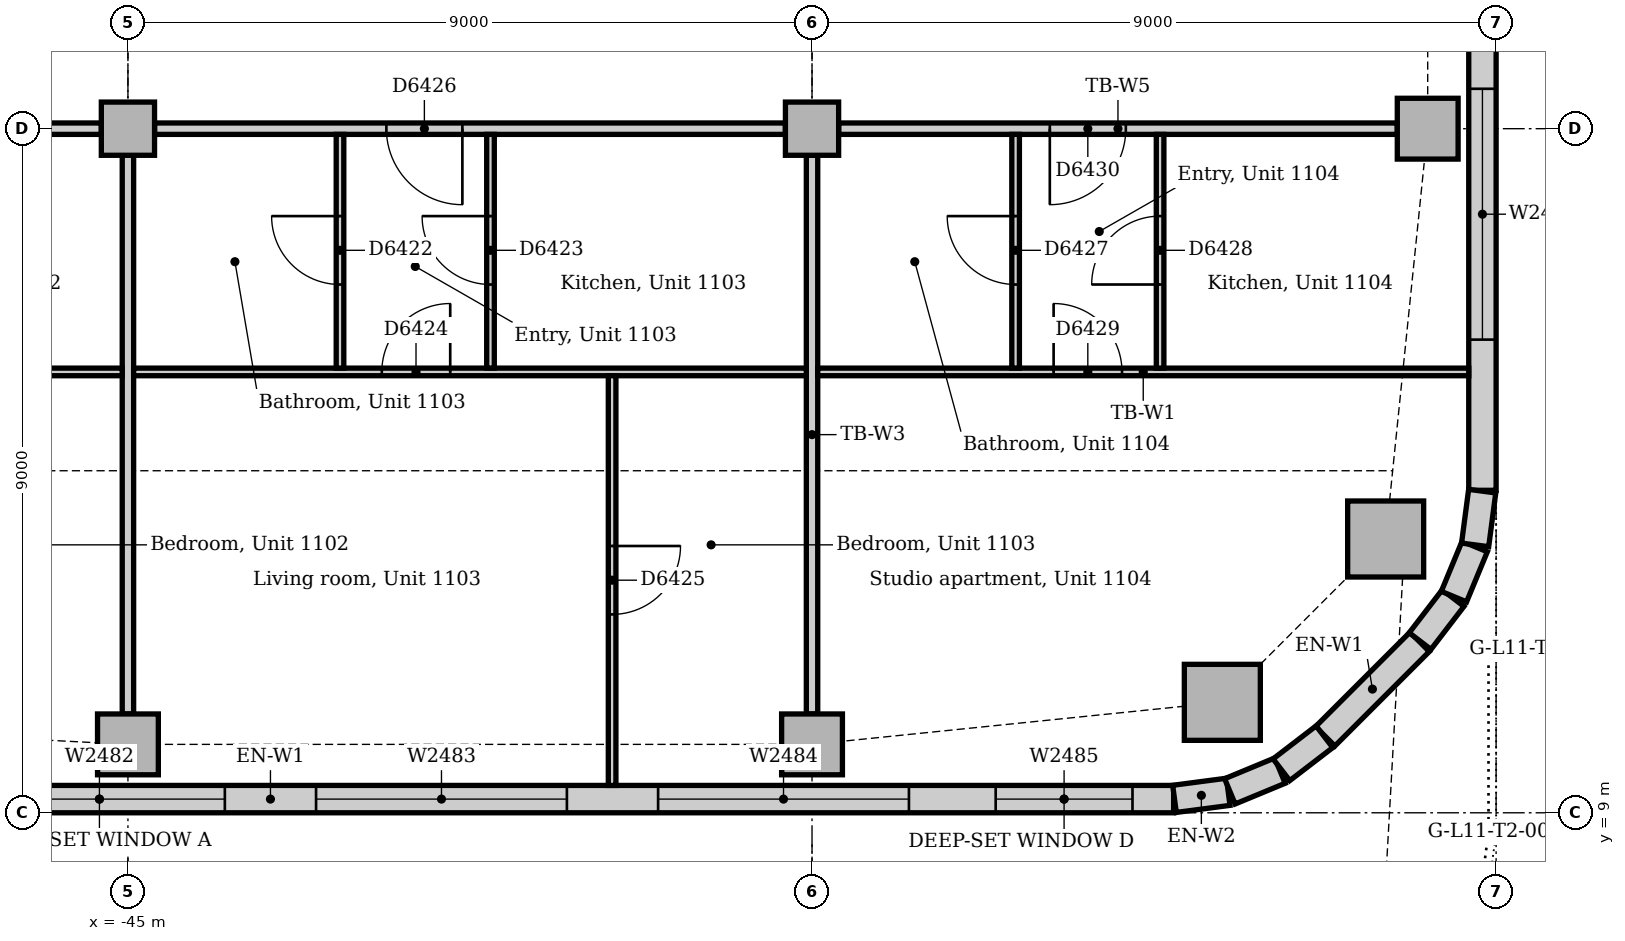
"""IFC4 building model, lengths in metres.
Left out: names, types, materials, properties, quantities, classifications, styles, units other than length and angle.
Written with IfcOpenShell. Run it as: python <this file> out.ifc"""

import sys

from ifc_helpers import new_model, si_unit, direction, frame, frame_2d, origin, origin_2d, place, context, subcontext, project, spatial, rectangle, extrude, element, fill, save


model = new_model("IFC4")
c1 = context("Model", 3, precision=1e-05, world=origin(), true_north=direction((0.0, 1.0)))
c2 = subcontext(c1, "Body", "Model", "MODEL_VIEW")
j1 = project(units=[si_unit("LENGTHUNIT", "METRE"), si_unit("PLANEANGLEUNIT", "RADIAN")], contexts=[c1])
p1 = place(None, origin())
s1 = spatial("IfcSite", under=j1, at=p1, CompositionType="ELEMENT")
p2 = place(p1, origin())
s2 = spatial("IfcBuilding", under=s1, at=p2, CompositionType="ELEMENT")
p3 = place(p2, frame((0.0, 0.0, 51.0)))
s3 = spatial("IfcBuildingStorey", under=s2, at=p3, CompositionType="ELEMENT", Elevation=51.0)
for number, where, z_axis, x_axis in (
    (1, (-30.602, 10.453, -0.15), (0.0, 0.0, 1.0), (1.0, 0.0, 0.0)),
    (2, (-28.453, 12.602, -0.15), (0.0, 0.0, 1.0), (1.0, 0.0, 0.0)),
):
    element("IfcColumn", number, at=place(p3, frame(where, z_axis=z_axis, x_axis=x_axis)), inside=s3, PredefinedType="COLUMN", context=c2, shape_type="SweptSolid", body=[
        extrude(rectangle(XDim=1.0, YDim=1.0, at=origin_2d()), origin(), (0.0, 0.0, 1.0), 4.0),
    ])
for number, where, z_axis, x_axis in (
    (3, (-45.0, 9.9, -0.15), (0.0, 0.0, 1.0), (1.0, 0.0, 0.0)),
    (4, (-36.0, 9.9, -0.15), (0.0, 0.0, 1.0), (1.0, 0.0, 0.0)),
):
    element("IfcColumn", number, at=place(p3, frame(where, z_axis=z_axis, x_axis=x_axis)), inside=s3, PredefinedType="COLUMN", context=c2, shape_type="SweptSolid", body=[
        extrude(rectangle(XDim=0.8, YDim=0.8, at=origin_2d()), origin(), (0.0, 0.0, 1.0), 4.0),
    ])
p4 = place(p3, frame((-27.9, 18.0, 0.0), z_axis=(0.0, 0.0, 1.0), x_axis=(1.0, 0.0, 0.0)))
e5 = element("IfcColumn", 5, at=p4, inside=s3, PredefinedType="COLUMN", context=c2, shape_type="SweptSolid", body=[
    extrude(rectangle(XDim=0.8, YDim=0.8, at=origin_2d()), origin(), (0.0, 0.0, 1.0), 3.85),
])
for number, where, z_axis, x_axis in (
    (6, (-45.0, 18.0, 0.0), (0.0, 0.0, 1.0), (1.0, 0.0, 0.0)),
    (7, (-36.0, 18.0, 0.0), (0.0, 0.0, 1.0), (1.0, 0.0, 0.0)),
):
    element("IfcColumn", number, at=place(p3, frame(where, z_axis=z_axis, x_axis=x_axis)), inside=s3, PredefinedType="COLUMN", context=c2, shape_type="SweptSolid", body=[
        extrude(rectangle(XDim=0.7, YDim=0.7, at=origin_2d()), origin(), (0.0, 0.0, 1.0), 3.85),
    ])
p5 = place(p3, frame((-55.007, 9.18, 0.0), z_axis=(0.0, 0.0, 1.0), x_axis=(1.0, 0.0, 0.0)))
e8 = element("IfcWall", 8, at=p5, inside=s3, PredefinedType="STANDARD", context=c2, shape_type="SweptSolid", body=[
    extrude(rectangle(XDim=23.765, YDim=0.36, at=frame_2d((11.882, 0.0))), origin(), (0.0, 0.0, 1.0), 3.85),
])
p6 = place(p5, frame((4.232, 0.0, 0.0)))
e9 = element("IfcOpeningElement", 9, at=p6, cuts=e8, PredefinedType="OPENING", context=c2, shape_type="SweptSolid", body=[
    extrude(rectangle(XDim=1.8, YDim=2.4, at=frame_2d((0.9, 1.2))), frame((0.0, 0.19, 0.0), z_axis=(0.0, -1.0, 0.0), x_axis=(1.0, 0.0, 0.0)), (0.0, 0.0, 1.0), 0.38),
])
p7 = place(p5, frame((7.982, 0.0, 0.9)))
e10 = element("IfcOpeningElement", 10, at=p7, cuts=e8, PredefinedType="OPENING", context=c2, shape_type="SweptSolid", body=[
    extrude(rectangle(XDim=3.3, YDim=1.6, at=frame_2d((1.65, 0.8))), frame((0.0, 0.19, 0.0), z_axis=(0.0, -1.0, 0.0), x_axis=(1.0, 0.0, 0.0)), (0.0, 0.0, 1.0), 0.38),
])
p8 = place(p5, frame((12.482, 0.0, 0.9)))
e11 = element("IfcOpeningElement", 11, at=p8, cuts=e8, PredefinedType="OPENING", context=c2, shape_type="SweptSolid", body=[
    extrude(rectangle(XDim=3.3, YDim=1.6, at=frame_2d((1.65, 0.8))), frame((0.0, 0.19, 0.0), z_axis=(0.0, -1.0, 0.0), x_axis=(1.0, 0.0, 0.0)), (0.0, 0.0, 1.0), 0.38),
])
p9 = place(p5, frame((16.982, 0.0, 0.9)))
e12 = element("IfcOpeningElement", 12, at=p9, cuts=e8, PredefinedType="OPENING", context=c2, shape_type="SweptSolid", body=[
    extrude(rectangle(XDim=3.3, YDim=1.6, at=frame_2d((1.65, 0.8))), frame((0.0, 0.19, 0.0), z_axis=(0.0, -1.0, 0.0), x_axis=(1.0, 0.0, 0.0)), (0.0, 0.0, 1.0), 0.38),
])
p10 = place(p5, frame((21.424, 0.0, 0.9)))
e13 = element("IfcOpeningElement", 13, at=p10, cuts=e8, PredefinedType="OPENING", context=c2, shape_type="SweptSolid", body=[
    extrude(rectangle(XDim=1.8, YDim=1.6, at=frame_2d((0.9, 0.8))), frame((0.0, 0.19, 0.0), z_axis=(0.0, -1.0, 0.0), x_axis=(1.0, 0.0, 0.0)), (0.0, 0.0, 1.0), 0.38),
])
p11 = place(p3, frame((-29.249, 10.006, 0.0), z_axis=(0.0, 0.0, 1.0), x_axis=(0.707106781187, 0.707106781187, 0.0)))
e14 = element("IfcWall", 14, at=p11, inside=s3, PredefinedType="STANDARD", context=c2, shape_type="SweptSolid", body=[
    extrude(rectangle(XDim=1.757, YDim=0.36, at=frame_2d((0.879, 0.0))), origin(), (0.0, 0.0, 1.0), 3.85),
])
p12 = place(p3, frame((-27.18, 13.243, 0.0), z_axis=(0.0, 0.0, 1.0), x_axis=(0.0, 1.0, 0.0)))
e15 = element("IfcWall", 15, at=p12, inside=s3, PredefinedType="STANDARD", context=c2, shape_type="SweptSolid", body=[
    extrude(rectangle(XDim=7.757, YDim=0.36, at=frame_2d((3.879, 0.0))), origin(), (0.0, 0.0, 1.0), 3.85),
])
p13 = place(p12, frame((1.982, 0.0, 0.9)))
e16 = element("IfcOpeningElement", 16, at=p13, cuts=e15, PredefinedType="OPENING", context=c2, shape_type="SweptSolid", body=[
    extrude(rectangle(XDim=3.3, YDim=1.6, at=frame_2d((1.65, 0.8))), frame((0.0, 0.19, 0.0), z_axis=(0.0, -1.0, 0.0), x_axis=(1.0, 0.0, 0.0)), (0.0, 0.0, 1.0), 0.38),
])
for number, where, z_axis, x_axis in (
    (17, (-31.231, 9.183, 0.0), (0.0, 0.0, 1.0), (0.991, 0.131, 0.0)),
    (18, (-30.503, 9.282, 0.0), (0.0, 0.0, 1.0), (0.924, 0.383, 0.0)),
):
    element("IfcWall", number, at=place(p3, frame(where, z_axis=z_axis, x_axis=x_axis)), inside=s3, PredefinedType="STANDARD", context=c2, shape_type="SweptSolid", body=[
        extrude(rectangle(XDim=0.713, YDim=0.36, at=frame_2d((0.356, 0.0))), origin(), (0.0, 0.0, 1.0), 3.85),
    ])
for number, where, z_axis, x_axis in (
    (19, (-29.825, 9.566, 0.0), (0.0, 0.0, 1.0), (0.793, 0.609, 0.0)),
    (20, (-28.0, 11.259, 0.0), (0.0, 0.0, 1.0), (0.609, 0.793, 0.0)),
):
    element("IfcWall", number, at=place(p3, frame(where, z_axis=z_axis, x_axis=x_axis)), inside=s3, PredefinedType="STANDARD", context=c2, shape_type="SweptSolid", body=[
        extrude(rectangle(XDim=0.713, YDim=0.36, at=frame_2d((0.357, 0.0))), origin(), (0.0, 0.0, 1.0), 3.85),
    ])
for number, where, z_axis, x_axis in (
    (21, (-27.555, 11.844, 0.0), (0.0, 0.0, 1.0), (0.383, 0.924, 0.0)),
    (22, (-27.276, 12.524, 0.0), (0.0, 0.0, 1.0), (0.131, 0.991, 0.0)),
):
    element("IfcWall", number, at=place(p3, frame(where, z_axis=z_axis, x_axis=x_axis)), inside=s3, PredefinedType="STANDARD", context=c2, shape_type="SweptSolid", body=[
        extrude(rectangle(XDim=0.713, YDim=0.36, at=frame_2d((0.356, 0.0))), origin(), (0.0, 0.0, 1.0), 3.85),
    ])
p14 = place(p3, frame((-35.65, 18.0, 0.0), z_axis=(0.0, 0.0, 1.0), x_axis=(1.0, 0.0, 0.0)))
e23 = element("IfcWall", 23, at=p14, inside=s3, PredefinedType="PARTITIONING", context=c2, shape_type="SweptSolid", body=[
    extrude(rectangle(XDim=7.35, YDim=0.15, at=frame_2d((3.675, 0.0))), origin(), (0.0, 0.0, 1.0), 3.158),
])
p15 = place(p14, frame((2.778, 0.0, 0.0)))
e24 = element("IfcOpeningElement", 24, at=p15, cuts=e23, PredefinedType="OPENING", context=c2, shape_type="SweptSolid", body=[
    extrude(rectangle(XDim=1.0, YDim=2.1, at=frame_2d((0.5, 1.05))), frame((0.0, 0.085, 0.0), z_axis=(0.0, -1.0, 0.0), x_axis=(1.0, 0.0, 0.0)), (0.0, 0.0, 1.0), 0.17),
])
p16 = place(p3, frame((-44.65, 18.0, 0.0), z_axis=(0.0, 0.0, 1.0), x_axis=(1.0, 0.0, 0.0)))
e25 = element("IfcWall", 25, at=p16, inside=s3, PredefinedType="PARTITIONING", context=c2, shape_type="SweptSolid", body=[
    extrude(rectangle(XDim=8.3, YDim=0.15, at=frame_2d((4.15, 0.0))), origin(), (0.0, 0.0, 1.0), 3.158),
])
p17 = place(p16, frame((3.05, 0.0, 0.0)))
e26 = element("IfcOpeningElement", 26, at=p17, cuts=e25, PredefinedType="OPENING", context=c2, shape_type="SweptSolid", body=[
    extrude(rectangle(XDim=1.0, YDim=2.1, at=frame_2d((0.5, 1.05))), frame((0.0, 0.085, 0.0), z_axis=(0.0, -1.0, 0.0), x_axis=(1.0, 0.0, 0.0)), (0.0, 0.0, 1.0), 0.17),
])
p18 = place(p3, frame((-53.65, 18.0, 0.0), z_axis=(0.0, 0.0, 1.0), x_axis=(1.0, 0.0, 0.0)))
e27 = element("IfcWall", 27, at=p18, inside=s3, PredefinedType="PARTITIONING", context=c2, shape_type="SweptSolid", body=[
    extrude(rectangle(XDim=8.3, YDim=0.15, at=frame_2d((4.15, 0.0))), origin(), (0.0, 0.0, 1.0), 3.158),
])
p19 = place(p18, frame((2.94, 0.0, 0.0)))
e28 = element("IfcOpeningElement", 28, at=p19, cuts=e27, PredefinedType="OPENING", context=c2, shape_type="SweptSolid", body=[
    extrude(rectangle(XDim=1.0, YDim=2.1, at=frame_2d((0.5, 1.05))), frame((0.0, 0.085, 0.0), z_axis=(0.0, -1.0, 0.0), x_axis=(1.0, 0.0, 0.0)), (0.0, 0.0, 1.0), 0.17),
])
for number, where, z_axis, x_axis in (
    (29, (-45.0, 10.3, 0.0), (0.0, 0.0, 1.0), (0.0, 1.0, 0.0)),
    (30, (-36.0, 10.3, 0.0), (0.0, 0.0, 1.0), (0.0, 1.0, 0.0)),
):
    element("IfcWall", number, at=place(p3, frame(where, z_axis=z_axis, x_axis=x_axis)), inside=s3, PredefinedType="PARTITIONING", context=c2, shape_type="SweptSolid", body=[
        extrude(rectangle(XDim=7.35, YDim=0.15, at=frame_2d((3.675, 0.0))), origin(), (0.0, 0.0, 1.0), 3.256),
    ])
p20 = place(p3, frame((-35.925, 14.8, 0.0), z_axis=(0.0, 0.0, 1.0), x_axis=(1.0, 0.0, 0.0)))
e31 = element("IfcWall", 31, at=p20, inside=s3, PredefinedType="PARTITIONING", context=c2, shape_type="SweptSolid", body=[
    extrude(rectangle(XDim=8.565, YDim=0.1, at=frame_2d((4.282, 0.0))), origin(), (0.0, 0.0, 1.0), 3.85),
])
p21 = place(p20, frame((3.103, 0.0, 0.0)))
e32 = element("IfcOpeningElement", 32, at=p21, cuts=e31, PredefinedType="OPENING", context=c2, shape_type="SweptSolid", body=[
    extrude(rectangle(XDim=0.9, YDim=2.1, at=frame_2d((0.45, 1.05))), frame((0.0, 0.06, 0.0), z_axis=(0.0, -1.0, 0.0), x_axis=(1.0, 0.0, 0.0)), (0.0, 0.0, 1.0), 0.12),
])
p22 = place(p3, frame((-44.925, 14.8, 0.0), z_axis=(0.0, 0.0, 1.0), x_axis=(1.0, 0.0, 0.0)))
e33 = element("IfcWall", 33, at=p22, inside=s3, PredefinedType="PARTITIONING", context=c2, shape_type="SweptSolid", body=[
    extrude(rectangle(XDim=8.85, YDim=0.1, at=frame_2d((4.425, 0.0))), origin(), (0.0, 0.0, 1.0), 3.85),
])
p23 = place(p22, frame((3.265, 0.0, 0.0)))
e34 = element("IfcOpeningElement", 34, at=p23, cuts=e33, PredefinedType="OPENING", context=c2, shape_type="SweptSolid", body=[
    extrude(rectangle(XDim=0.9, YDim=2.1, at=frame_2d((0.45, 1.05))), frame((0.0, 0.06, 0.0), z_axis=(0.0, -1.0, 0.0), x_axis=(1.0, 0.0, 0.0)), (0.0, 0.0, 1.0), 0.12),
])
p24 = place(p3, frame((-53.925, 14.8, 0.0), z_axis=(0.0, 0.0, 1.0), x_axis=(1.0, 0.0, 0.0)))
e35 = element("IfcWall", 35, at=p24, inside=s3, PredefinedType="PARTITIONING", context=c2, shape_type="SweptSolid", body=[
    extrude(rectangle(XDim=8.85, YDim=0.1, at=frame_2d((4.425, 0.0))), origin(), (0.0, 0.0, 1.0), 3.85),
])
p25 = place(p24, frame((3.265, 0.0, 0.0)))
e36 = element("IfcOpeningElement", 36, at=p25, cuts=e35, PredefinedType="OPENING", context=c2, shape_type="SweptSolid", body=[
    extrude(rectangle(XDim=0.9, YDim=2.1, at=frame_2d((0.45, 1.05))), frame((0.0, 0.06, 0.0), z_axis=(0.0, -1.0, 0.0), x_axis=(1.0, 0.0, 0.0)), (0.0, 0.0, 1.0), 0.12),
])
p26 = place(p3, frame((-38.63, 9.36, 0.0), z_axis=(0.0, 0.0, 1.0), x_axis=(0.0, 1.0, 0.0)))
e37 = element("IfcWall", 37, at=p26, inside=s3, PredefinedType="PARTITIONING", context=c2, shape_type="SweptSolid", body=[
    extrude(rectangle(XDim=5.39, YDim=0.1, at=frame_2d((2.695, 0.0))), origin(), (0.0, 0.0, 1.0), 3.85),
])
p27 = place(p26, frame((2.25, 0.0, 0.0)))
e38 = element("IfcOpeningElement", 38, at=p27, cuts=e37, PredefinedType="OPENING", context=c2, shape_type="SweptSolid", body=[
    extrude(rectangle(XDim=0.9, YDim=2.1, at=frame_2d((0.45, 1.05))), frame((0.0, 0.06, 0.0), z_axis=(0.0, -1.0, 0.0), x_axis=(1.0, 0.0, 0.0)), (0.0, 0.0, 1.0), 0.12),
])
p28 = place(p3, frame((-42.21, 14.85, 0.0), z_axis=(0.0, 0.0, 1.0), x_axis=(0.0, 1.0, 0.0)))
e39 = element("IfcWall", 39, at=p28, inside=s3, PredefinedType="PARTITIONING", context=c2, shape_type="SweptSolid", body=[
    extrude(rectangle(XDim=3.075, YDim=0.1, at=frame_2d((1.538, 0.0))), origin(), (0.0, 0.0, 1.0), 3.85),
])
p29 = place(p28, frame((1.1, 0.0, 0.0)))
e40 = element("IfcOpeningElement", 40, at=p29, cuts=e39, PredefinedType="OPENING", context=c2, shape_type="SweptSolid", body=[
    extrude(rectangle(XDim=0.9, YDim=2.1, at=frame_2d((0.45, 1.05))), frame((0.0, 0.06, 0.0), z_axis=(0.0, -1.0, 0.0), x_axis=(1.0, 0.0, 0.0)), (0.0, 0.0, 1.0), 0.12),
])
p30 = place(p3, frame((-40.23, 14.85, 0.0), z_axis=(0.0, 0.0, 1.0), x_axis=(0.0, 1.0, 0.0)))
e41 = element("IfcWall", 41, at=p30, inside=s3, PredefinedType="PARTITIONING", context=c2, shape_type="SweptSolid", body=[
    extrude(rectangle(XDim=3.075, YDim=0.1, at=frame_2d((1.538, 0.0))), origin(), (0.0, 0.0, 1.0), 3.85),
])
p31 = place(p30, frame((1.1, 0.0, 0.0)))
e42 = element("IfcOpeningElement", 42, at=p31, cuts=e41, PredefinedType="OPENING", context=c2, shape_type="SweptSolid", body=[
    extrude(rectangle(XDim=0.9, YDim=2.1, at=frame_2d((0.45, 1.05))), frame((0.0, 0.06, 0.0), z_axis=(0.0, -1.0, 0.0), x_axis=(1.0, 0.0, 0.0)), (0.0, 0.0, 1.0), 0.12),
])
p32 = place(p3, frame((-33.322, 14.85, 0.0), z_axis=(0.0, 0.0, 1.0), x_axis=(0.0, 1.0, 0.0)))
e43 = element("IfcWall", 43, at=p32, inside=s3, PredefinedType="PARTITIONING", context=c2, shape_type="SweptSolid", body=[
    extrude(rectangle(XDim=3.075, YDim=0.1, at=frame_2d((1.538, 0.0))), origin(), (0.0, 0.0, 1.0), 3.85),
])
p33 = place(p32, frame((1.1, 0.0, 0.0)))
e44 = element("IfcOpeningElement", 44, at=p33, cuts=e43, PredefinedType="OPENING", context=c2, shape_type="SweptSolid", body=[
    extrude(rectangle(XDim=0.9, YDim=2.1, at=frame_2d((0.45, 1.05))), frame((0.0, 0.06, 0.0), z_axis=(0.0, -1.0, 0.0), x_axis=(1.0, 0.0, 0.0)), (0.0, 0.0, 1.0), 0.12),
])
p34 = place(p3, frame((-31.421, 14.85, 0.0), z_axis=(0.0, 0.0, 1.0), x_axis=(0.0, 1.0, 0.0)))
e45 = element("IfcWall", 45, at=p34, inside=s3, PredefinedType="PARTITIONING", context=c2, shape_type="SweptSolid", body=[
    extrude(rectangle(XDim=3.075, YDim=0.1, at=frame_2d((1.538, 0.0))), origin(), (0.0, 0.0, 1.0), 3.85),
])
p35 = place(p34, frame((1.1, 0.0, 0.0)))
e46 = element("IfcOpeningElement", 46, at=p35, cuts=e45, PredefinedType="OPENING", context=c2, shape_type="SweptSolid", body=[
    extrude(rectangle(XDim=0.9, YDim=2.1, at=frame_2d((0.45, 1.05))), frame((0.0, 0.06, 0.0), z_axis=(0.0, -1.0, 0.0), x_axis=(1.0, 0.0, 0.0)), (0.0, 0.0, 1.0), 0.12),
])
p36 = place(p7, origin())
e47 = element("IfcWindow", 47, at=p36, inside=s3, PartitioningType="SINGLE_PANEL", PredefinedType="WINDOW", context=c2, shape_type="SweptSolid", body=[
    extrude(rectangle(XDim=3.3, YDim=1.6, at=frame_2d((1.65, 0.8))), frame((0.0, 0.13, 0.0), z_axis=(0.0, -1.0, 0.0), x_axis=(1.0, 0.0, 0.0)), (0.0, 0.0, 1.0), 0.06),
])
fill(e10, e47)
p37 = place(p8, origin())
e48 = element("IfcWindow", 48, at=p37, inside=s3, PartitioningType="SINGLE_PANEL", PredefinedType="WINDOW", context=c2, shape_type="SweptSolid", body=[
    extrude(rectangle(XDim=3.3, YDim=1.6, at=frame_2d((1.65, 0.8))), frame((0.0, 0.13, 0.0), z_axis=(0.0, -1.0, 0.0), x_axis=(1.0, 0.0, 0.0)), (0.0, 0.0, 1.0), 0.06),
])
fill(e11, e48)
p38 = place(p9, origin())
e49 = element("IfcWindow", 49, at=p38, inside=s3, PartitioningType="SINGLE_PANEL", PredefinedType="WINDOW", context=c2, shape_type="SweptSolid", body=[
    extrude(rectangle(XDim=3.3, YDim=1.6, at=frame_2d((1.65, 0.8))), frame((0.0, 0.13, 0.0), z_axis=(0.0, -1.0, 0.0), x_axis=(1.0, 0.0, 0.0)), (0.0, 0.0, 1.0), 0.06),
])
fill(e12, e49)
p39 = place(p10, origin())
e50 = element("IfcWindow", 50, at=p39, inside=s3, PartitioningType="SINGLE_PANEL", PredefinedType="WINDOW", context=c2, shape_type="SweptSolid", body=[
    extrude(rectangle(XDim=1.8, YDim=1.6, at=frame_2d((0.9, 0.8))), frame((0.0, 0.13, 0.0), z_axis=(0.0, -1.0, 0.0), x_axis=(1.0, 0.0, 0.0)), (0.0, 0.0, 1.0), 0.06),
])
fill(e13, e50)
p40 = place(p13, origin())
e51 = element("IfcWindow", 51, at=p40, inside=s3, PartitioningType="SINGLE_PANEL", PredefinedType="WINDOW", context=c2, shape_type="SweptSolid", body=[
    extrude(rectangle(XDim=3.3, YDim=1.6, at=frame_2d((1.65, 0.8))), frame((0.0, 0.13, 0.0), z_axis=(0.0, -1.0, 0.0), x_axis=(1.0, 0.0, 0.0)), (0.0, 0.0, 1.0), 0.06),
])
fill(e16, e51)
p41 = place(p29, origin())
e52 = element("IfcDoor", 52, at=p41, inside=s3, OperationType="SINGLE_SWING_RIGHT", PredefinedType="DOOR", context=c2, shape_type="SweptSolid", body=[
    extrude(rectangle(XDim=0.9, YDim=2.1, at=frame_2d((0.45, 1.05))), frame((0.0, 0.025, 0.0), z_axis=(0.0, -1.0, 0.0), x_axis=(1.0, 0.0, 0.0)), (0.0, 0.0, 1.0), 0.05),
])
fill(e40, e52)
p42 = place(p31, origin())
e53 = element("IfcDoor", 53, at=p42, inside=s3, OperationType="SINGLE_SWING_RIGHT", PredefinedType="DOOR", context=c2, shape_type="SweptSolid", body=[
    extrude(rectangle(XDim=0.9, YDim=2.1, at=frame_2d((0.45, 1.05))), frame((0.0, 0.025, 0.0), z_axis=(0.0, -1.0, 0.0), x_axis=(1.0, 0.0, 0.0)), (0.0, 0.0, 1.0), 0.05),
])
fill(e42, e53)
p43 = place(p23, origin())
e54 = element("IfcDoor", 54, at=p43, inside=s3, OperationType="SINGLE_SWING_RIGHT", PredefinedType="DOOR", context=c2, shape_type="SweptSolid", body=[
    extrude(rectangle(XDim=0.9, YDim=2.1, at=frame_2d((0.45, 1.05))), frame((0.0, 0.025, 0.0), z_axis=(0.0, -1.0, 0.0), x_axis=(1.0, 0.0, 0.0)), (0.0, 0.0, 1.0), 0.05),
])
fill(e34, e54)
p44 = place(p27, frame((0.9, 0.0, 0.0), z_axis=(0.0, 0.0, 1.0), x_axis=(-1.0, 0.0, 0.0)))
e55 = element("IfcDoor", 55, at=p44, inside=s3, OperationType="SINGLE_SWING_LEFT", PredefinedType="DOOR", context=c2, shape_type="SweptSolid", body=[
    extrude(rectangle(XDim=0.9, YDim=2.1, at=frame_2d((0.45, 1.05))), frame((0.0, 0.025, 0.0), z_axis=(0.0, -1.0, 0.0), x_axis=(1.0, 0.0, 0.0)), (0.0, 0.0, 1.0), 0.05),
])
fill(e38, e55)
p45 = place(p17, frame((1.0, 0.0, 0.0), z_axis=(0.0, 0.0, 1.0), x_axis=(-1.0, 0.0, 0.0)))
e56 = element("IfcDoor", 56, at=p45, inside=s3, OperationType="SINGLE_SWING_LEFT", PredefinedType="DOOR", context=c2, shape_type="SweptSolid", body=[
    extrude(rectangle(XDim=1.0, YDim=2.1, at=frame_2d((0.5, 1.05))), frame((0.0, 0.025, 0.0), z_axis=(0.0, -1.0, 0.0), x_axis=(1.0, 0.0, 0.0)), (0.0, 0.0, 1.0), 0.05),
])
fill(e26, e56)
p46 = place(p33, origin())
e57 = element("IfcDoor", 57, at=p46, inside=s3, OperationType="SINGLE_SWING_RIGHT", PredefinedType="DOOR", context=c2, shape_type="SweptSolid", body=[
    extrude(rectangle(XDim=0.9, YDim=2.1, at=frame_2d((0.45, 1.05))), frame((0.0, 0.025, 0.0), z_axis=(0.0, -1.0, 0.0), x_axis=(1.0, 0.0, 0.0)), (0.0, 0.0, 1.0), 0.05),
])
fill(e44, e57)
p47 = place(p35, origin())
e58 = element("IfcDoor", 58, at=p47, inside=s3, OperationType="SINGLE_SWING_LEFT", PredefinedType="DOOR", context=c2, shape_type="SweptSolid", body=[
    extrude(rectangle(XDim=0.9, YDim=2.1, at=frame_2d((0.45, 1.05))), frame((0.0, 0.025, 0.0), z_axis=(0.0, -1.0, 0.0), x_axis=(1.0, 0.0, 0.0)), (0.0, 0.0, 1.0), 0.05),
])
fill(e46, e58)
p48 = place(p21, origin())
e59 = element("IfcDoor", 59, at=p48, inside=s3, OperationType="SINGLE_SWING_LEFT", PredefinedType="DOOR", context=c2, shape_type="SweptSolid", body=[
    extrude(rectangle(XDim=0.9, YDim=2.1, at=frame_2d((0.45, 1.05))), frame((0.0, 0.025, 0.0), z_axis=(0.0, -1.0, 0.0), x_axis=(1.0, 0.0, 0.0)), (0.0, 0.0, 1.0), 0.05),
])
fill(e32, e59)
p49 = place(p15, frame((1.0, 0.0, 0.0), z_axis=(0.0, 0.0, 1.0), x_axis=(-1.0, 0.0, 0.0)))
e60 = element("IfcDoor", 60, at=p49, inside=s3, OperationType="SINGLE_SWING_RIGHT", PredefinedType="DOOR", context=c2, shape_type="SweptSolid", body=[
    extrude(rectangle(XDim=1.0, YDim=2.1, at=frame_2d((0.5, 1.05))), frame((0.0, 0.025, 0.0), z_axis=(0.0, -1.0, 0.0), x_axis=(1.0, 0.0, 0.0)), (0.0, 0.0, 1.0), 0.05),
])
fill(e24, e60)
save(model, sys.argv[1])
